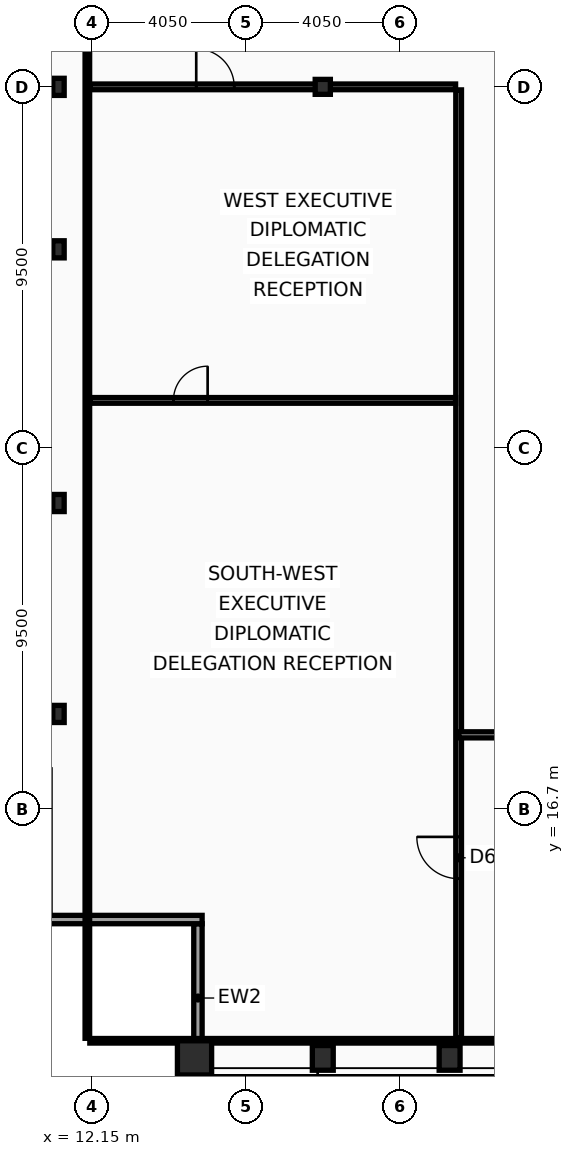
"""IFC4 building model, lengths in metres.
Left out: names, types, materials, properties, quantities, classifications, styles, units other than length and angle.
Written with IfcOpenShell. Run it as: python <this file> out.ifc"""

import sys

from ifc_helpers import new_model, si_unit, direction, frame, frame_2d, origin, origin_2d, place, context, subcontext, project, spatial, rectangle, hollow_rectangle, i_section, extrude, element, fill, save


model = new_model("IFC4")
c1 = context("Model", 3, precision=1e-05, world=origin(), true_north=direction((0.0, 1.0)))
c2 = subcontext(c1, "Body", "Model", "MODEL_VIEW")
j1 = project(units=[si_unit("LENGTHUNIT", "METRE"), si_unit("PLANEANGLEUNIT", "RADIAN")], contexts=[c1])
p1 = place(None, origin())
s1 = spatial("IfcSite", under=j1, at=p1, CompositionType="ELEMENT")
p2 = place(p1, origin())
s2 = spatial("IfcBuilding", under=s1, at=p2, CompositionType="ELEMENT")
p3 = place(p2, frame((0.0, 0.0, 325.4)))
s3 = spatial("IfcBuildingStorey", under=s2, at=p3, CompositionType="ELEMENT", Elevation=325.4)
p4 = place(p3, frame((14.85, 10.15, 0.0), z_axis=(0.0, 0.0, 1.0), x_axis=(1.0, 0.0, 0.0)))
e1 = element("IfcColumn", 1, at=p4, inside=s3, PredefinedType="COLUMN", context=c2, shape_type="SweptSolid", body=[
    extrude(hollow_rectangle(XDim=0.9, YDim=0.9, WallThickness=0.05, at=origin_2d()), origin(), (0.0, 0.0, 1.0), 3.6),
])
for number, where, z_axis, x_axis in (
    (2, (18.225, 10.15, 0.0), (0.0, 0.0, 1.0), (1.0, 0.0, 0.0)),
    (3, (21.562, 10.15, 0.0), (0.0, 0.0, 1.0), (1.0, 0.0, 0.0)),
):
    element("IfcColumn", number, at=place(p3, frame(where, z_axis=z_axis, x_axis=x_axis)), inside=s3, PredefinedType="COLUMN", context=c2, shape_type="SweptSolid", body=[
        extrude(hollow_rectangle(XDim=0.55, YDim=0.65, WallThickness=0.04, at=origin_2d()), origin(), (0.0, 0.0, 1.0), 3.6),
    ])
for number, where, z_axis, x_axis in (
    (4, (11.27, 19.2, 0.0), (0.0, 0.0, 1.0), (1.0, 0.0, 0.0)),
    (5, (11.27, 24.75, 0.0), (0.0, 0.0, 1.0), (1.0, 0.0, 0.0)),
    (6, (11.27, 31.425, 0.0), (0.0, 0.0, 1.0), (1.0, 0.0, 0.0)),
    (7, (11.27, 35.7, 0.0), (0.0, 0.0, 1.0), (1.0, 0.0, 0.0)),
):
    element("IfcColumn", number, at=place(p3, frame(where, z_axis=z_axis, x_axis=x_axis)), inside=s3, PredefinedType="COLUMN", context=c2, shape_type="SweptSolid", body=[
        extrude(i_section(OverallWidth=0.3, OverallDepth=0.45, WebThickness=0.014, FlangeThickness=0.026, at=origin_2d()), origin(), (0.0, 0.0, 1.0), 3.6),
    ])
p5 = place(p3, frame((18.225, 35.7, 0.0), z_axis=(0.0, 0.0, 1.0), x_axis=(1.0, 0.0, 0.0)))
e8 = element("IfcColumn", 8, at=p5, inside=s3, PredefinedType="COLUMN", context=c2, shape_type="SweptSolid", body=[
    extrude(i_section(OverallWidth=0.399, OverallDepth=0.393, WebThickness=0.023, FlangeThickness=0.037, at=origin_2d()), origin(), (0.0, 0.0, 1.0), 3.6),
])
p6 = place(p3, frame((14.94, 9.77, 0.0), z_axis=(0.0, 0.0, 1.0), x_axis=(0.0, 1.0, 0.0)))
e9 = element("IfcWall", 9, at=p6, inside=s3, PredefinedType="SOLIDWALL", context=c2, shape_type="SweptSolid", body=[
    extrude(rectangle(XDim=3.91, YDim=0.22, at=frame_2d((1.955, 0.0))), origin(), (0.0, 0.0, 1.0), 2.88),
])
p7 = place(p3, frame((15.05, 13.79, 0.0), z_axis=(0.0, 0.0, 1.0), x_axis=(-1.0, 0.0, 0.0)))
e10 = element("IfcWall", 10, at=p7, inside=s3, PredefinedType="SOLIDWALL", context=c2, shape_type="SweptSolid", body=[
    extrude(rectangle(XDim=4.22, YDim=0.22, at=frame_2d((2.11, 0.0))), origin(), (0.0, 0.0, 1.0), 2.88),
])
p8 = place(p3, frame((21.8, 10.665, 0.0), z_axis=(0.0, 0.0, 1.0), x_axis=(0.0, 1.0, 0.0)))
e11 = element("IfcWall", 11, at=p8, inside=s3, PredefinedType="PARTITIONING", context=c2, shape_type="SweptSolid", body=[
    extrude(rectangle(XDim=24.955, YDim=0.15, at=frame_2d((12.478, 0.0))), origin(), (0.0, 0.0, 1.0), 3.07),
])
p9 = place(p8, frame((4.2, 0.0, 0.0)))
e12 = element("IfcOpeningElement", 12, at=p9, cuts=e11, PredefinedType="OPENING", context=c2, shape_type="SweptSolid", body=[
    extrude(rectangle(XDim=1.1, YDim=2.1, at=frame_2d((0.55, 1.05))), frame((0.0, 0.085, 0.0), z_axis=(0.0, -1.0, 0.0), x_axis=(1.0, 0.0, 0.0)), (0.0, 0.0, 1.0), 0.17),
])
p10 = place(p3, frame((12.095, 35.7, 0.0), z_axis=(0.0, 0.0, 1.0), x_axis=(1.0, 0.0, 0.0)))
e13 = element("IfcWall", 13, at=p10, inside=s3, PredefinedType="PARTITIONING", context=c2, shape_type="SweptSolid", body=[
    extrude(rectangle(XDim=9.625, YDim=0.15, at=frame_2d((4.812, 0.0))), origin(), (0.0, 0.0, 1.0), 2.83),
])
p11 = place(p10, frame((2.8, 0.0, 0.0)))
e14 = element("IfcOpeningElement", 14, at=p11, cuts=e13, PredefinedType="OPENING", context=c2, shape_type="SweptSolid", body=[
    extrude(rectangle(XDim=1.0, YDim=2.05, at=frame_2d((0.5, 1.025))), frame((0.0, 0.085, 0.0), z_axis=(0.0, -1.0, 0.0), x_axis=(1.0, 0.0, 0.0)), (0.0, 0.0, 1.0), 0.17),
])
p12 = place(p3, frame((12.095, 27.45, 0.0), z_axis=(0.0, 0.0, 1.0), x_axis=(1.0, 0.0, 0.0)))
e15 = element("IfcWall", 15, at=p12, inside=s3, PredefinedType="PARTITIONING", context=c2, shape_type="SweptSolid", body=[
    extrude(rectangle(XDim=9.625, YDim=0.15, at=frame_2d((4.812, 0.0))), origin(), (0.0, 0.0, 1.0), 2.83),
])
p13 = place(p12, frame((2.2, 0.0, 0.0)))
e16 = element("IfcOpeningElement", 16, at=p13, cuts=e15, PredefinedType="OPENING", context=c2, shape_type="SweptSolid", body=[
    extrude(rectangle(XDim=0.9, YDim=2.05, at=frame_2d((0.45, 1.025))), frame((0.0, 0.085, 0.0), z_axis=(0.0, -1.0, 0.0), x_axis=(1.0, 0.0, 0.0)), (0.0, 0.0, 1.0), 0.17),
])
p14 = place(p3, frame((21.8, 18.65, 0.0), z_axis=(0.0, 0.0, 1.0), x_axis=(1.0, 0.0, 0.0)))
e17 = element("IfcWall", 17, at=p14, inside=s3, PredefinedType="PARTITIONING", context=c2, shape_type="SweptSolid", body=[
    extrude(rectangle(XDim=7.778, YDim=0.16, at=frame_2d((3.889, 0.0))), origin(), (0.0, 0.0, 1.0), 2.83),
])
p15 = place(p14, frame((3.767, 0.0, 0.0)))
e18 = element("IfcOpeningElement", 18, at=p15, cuts=e17, PredefinedType="OPENING", context=c2, shape_type="SweptSolid", body=[
    extrude(rectangle(XDim=1.0, YDim=2.05, at=frame_2d((0.5, 1.025))), frame((0.0, 0.09, 0.0), z_axis=(0.0, -1.0, 0.0), x_axis=(1.0, 0.0, 0.0)), (0.0, 0.0, 1.0), 0.18),
])
p16 = place(p3, frame((12.03, 10.665, 0.0), z_axis=(0.0, 0.0, 1.0), x_axis=(0.0, 1.0, 0.0)))
e19 = element("IfcWall", 19, at=p16, inside=s3, PredefinedType="PARTITIONING", context=c2, shape_type="SweptSolid", body=[
    extrude(rectangle(XDim=42.11, YDim=0.12, at=frame_2d((21.055, 0.0))), origin(), (0.0, 0.0, 1.0), 2.83),
])
p17 = place(p3, frame((12.095, 10.6, 0.0), z_axis=(0.0, 0.0, 1.0), x_axis=(1.0, 0.0, 0.0)))
e20 = element("IfcWall", 20, at=p17, inside=s3, PredefinedType="PARTITIONING", context=c2, shape_type="SweptSolid", body=[
    extrude(rectangle(XDim=48.71, YDim=0.12, at=frame_2d((24.355, 0.0))), origin(), (0.0, 0.0, 1.0), 2.83),
])
p18 = place(p9, origin())
e21 = element("IfcDoor", 21, at=p18, inside=s3, OperationType="SINGLE_SWING_RIGHT", PredefinedType="DOOR", context=c2, shape_type="SweptSolid", body=[
    extrude(rectangle(XDim=1.1, YDim=2.1, at=frame_2d((0.55, 1.05))), frame((0.0, 0.025, 0.0), z_axis=(0.0, -1.0, 0.0), x_axis=(1.0, 0.0, 0.0)), (0.0, 0.0, 1.0), 0.05),
])
fill(e12, e21)
p19 = place(p11, origin())
e22 = element("IfcDoor", 22, at=p19, inside=s3, OperationType="SINGLE_SWING_LEFT", PredefinedType="DOOR", context=c2, shape_type="SweptSolid", body=[
    extrude(rectangle(XDim=1.0, YDim=2.05, at=frame_2d((0.5, 1.025))), frame((0.0, 0.025, 0.0), z_axis=(0.0, -1.0, 0.0), x_axis=(1.0, 0.0, 0.0)), (0.0, 0.0, 1.0), 0.05),
])
fill(e14, e22)
p20 = place(p13, origin())
e23 = element("IfcDoor", 23, at=p20, inside=s3, OperationType="SINGLE_SWING_RIGHT", PredefinedType="DOOR", context=c2, shape_type="SweptSolid", body=[
    extrude(rectangle(XDim=0.9, YDim=2.05, at=frame_2d((0.45, 1.025))), frame((0.0, 0.025, 0.0), z_axis=(0.0, -1.0, 0.0), x_axis=(1.0, 0.0, 0.0)), (0.0, 0.0, 1.0), 0.05),
])
fill(e16, e23)
save(model, sys.argv[1])
